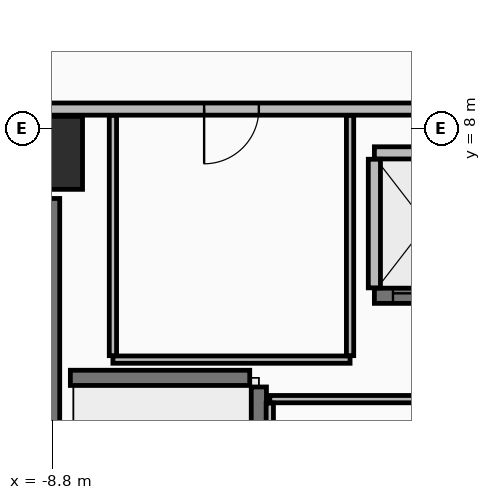
"""IFC4 building model, lengths in metres.
Left out: names, types, materials, properties, quantities, classifications, styles, units other than length and angle.
Written with IfcOpenShell. Run it as: python <this file> out.ifc"""

import sys

from ifc_helpers import new_model, si_unit, direction, frame, frame_2d, origin, origin_2d, place, context, subcontext, project, spatial, rectangle, extrude, element, fill, save


model = new_model("IFC4")
c1 = context("Model", 3, precision=1e-05, world=origin(), true_north=direction((0.0, 1.0)))
c2 = subcontext(c1, "Body", "Model", "MODEL_VIEW")
j1 = project(units=[si_unit("LENGTHUNIT", "METRE"), si_unit("PLANEANGLEUNIT", "RADIAN")], contexts=[c1])
p1 = place(None, origin())
s1 = spatial("IfcSite", under=j1, at=p1, CompositionType="ELEMENT")
p2 = place(p1, origin())
s2 = spatial("IfcBuilding", under=s1, at=p2, CompositionType="ELEMENT")
p3 = place(p2, frame((0.0, 0.0, 211.25)))
s3 = spatial("IfcBuildingStorey", under=s2, at=p3, CompositionType="ELEMENT", Elevation=211.25)
p4 = place(p3, frame((-8.9, 7.6, 0.0), z_axis=(0.0, 0.0, 1.0), x_axis=(1.0, 0.0, 0.0)))
e1 = element("IfcColumn", 1, at=p4, inside=s3, PredefinedType="COLUMN", context=c2, shape_type="SweptSolid", body=[
    extrude(rectangle(XDim=1.2, YDim=1.2, at=origin_2d()), origin(), (0.0, 0.0, 1.0), 3.6),
])
p5 = place(p3, frame((-8.9, -3.85, 0.0), z_axis=(0.0, 0.0, 1.0), x_axis=(0.0, 1.0, 0.0)))
e2 = element("IfcWall", 2, at=p5, inside=s3, PredefinedType="SHEAR", context=c2, shape_type="SweptSolid", body=[
    extrude(rectangle(XDim=10.7, YDim=0.45, at=frame_2d((5.35, 0.0))), origin(), (0.0, 0.0, 1.0), 3.42),
])
p6 = place(p3, frame((9.62, 8.32, 0.0), z_axis=(0.0, 0.0, 1.0), x_axis=(-1.0, 0.0, 0.0)))
e3 = element("IfcWall", 3, at=p6, inside=s3, PredefinedType="PARTITIONING", context=c2, shape_type="SweptSolid", body=[
    extrude(rectangle(XDim=19.24, YDim=0.2, at=frame_2d((9.62, 0.0))), origin(), (0.0, 0.0, 1.0), 2.865),
])
p7 = place(p6, frame((15.02, 0.0, 0.0)))
e4 = element("IfcOpeningElement", 4, at=p7, cuts=e3, PredefinedType="OPENING", context=c2, shape_type="SweptSolid", body=[
    extrude(rectangle(XDim=0.9, YDim=2.1, at=frame_2d((0.45, 1.05))), frame((0.0, 0.11, 0.0), z_axis=(0.0, -1.0, 0.0), x_axis=(1.0, 0.0, 0.0)), (0.0, 0.0, 1.0), 0.22),
])
p8 = place(p3, frame((-5.4, -3.55, 0.0), z_axis=(0.0, 0.0, 1.0), x_axis=(0.0, 1.0, 0.0)))
e5 = element("IfcWall", 5, at=p8, inside=s3, PredefinedType="SHEAR", context=c2, shape_type="SweptSolid", body=[
    extrude(rectangle(XDim=7.3, YDim=0.25, at=frame_2d((3.65, 0.0))), origin(), (0.0, 0.0, 1.0), 3.42),
])
p9 = place(p3, frame((-8.5, 3.9, 0.0), z_axis=(0.0, 0.0, 1.0), x_axis=(1.0, 0.0, 0.0)))
e6 = element("IfcWall", 6, at=p9, inside=s3, PredefinedType="SHEAR", context=c2, shape_type="SweptSolid", body=[
    extrude(rectangle(XDim=2.95, YDim=0.25, at=frame_2d((1.475, 0.0))), origin(), (0.0, 0.0, 1.0), 3.42),
])
p10 = place(p3, frame((-3.5, 5.25, 0.0), z_axis=(0.0, 0.0, 1.0), x_axis=(1.0, 0.0, 0.0)))
e7 = element("IfcWall", 7, at=p10, inside=s3, PredefinedType="SHEAR", context=c2, shape_type="SweptSolid", body=[
    extrude(rectangle(XDim=1.712, YDim=0.25, at=frame_2d((0.856, 0.0))), origin(), (0.0, 0.0, 1.0), 3.42),
])
p11 = place(p10, frame((0.306, 0.0, 0.0)))
e8 = element("IfcOpeningElement", 8, at=p11, cuts=e7, PredefinedType="OPENING", context=c2, shape_type="SweptSolid", body=[
    extrude(rectangle(XDim=1.1, YDim=2.2, at=frame_2d((0.55, 1.1))), frame((0.0, 0.135, 0.0), z_axis=(0.0, -1.0, 0.0), x_axis=(1.0, 0.0, 0.0)), (0.0, 0.0, 1.0), 0.27),
])
p12 = place(p3, frame((-3.5, 7.6, 0.0), z_axis=(0.0, 0.0, 1.0), x_axis=(1.0, 0.0, 0.0)))
e9 = element("IfcWall", 9, at=p12, inside=s3, PredefinedType="PARTITIONING", context=c2, shape_type="SweptSolid", body=[
    extrude(rectangle(XDim=0.7, YDim=0.2, at=frame_2d((0.35, 0.0))), origin(), (0.0, 0.0, 1.0), 2.715),
])
p13 = place(p3, frame((-3.5, 5.38, 0.0), z_axis=(0.0, 0.0, 1.0), x_axis=(0.0, 1.0, 0.0)))
e10 = element("IfcWall", 10, at=p13, inside=s3, PredefinedType="PARTITIONING", context=c2, shape_type="SweptSolid", body=[
    extrude(rectangle(XDim=2.115, YDim=0.2, at=frame_2d((1.058, 0.0))), origin(), (0.0, 0.0, 1.0), 2.715),
])
p14 = place(p3, frame((-2.115, 3.55, 0.0), z_axis=(0.0, 0.0, 1.0), x_axis=(-1.0, 0.0, 0.0)))
e11 = element("IfcWall", 11, at=p14, inside=s3, PredefinedType="PARTITIONING", context=c2, shape_type="SweptSolid", body=[
    extrude(rectangle(XDim=3.105, YDim=0.12, at=frame_2d((1.552, 0.0))), origin(), (0.0, 0.0, 1.0), 3.42),
])
p15 = place(p3, frame((-5.22, 3.485, 0.0), z_axis=(0.0, 0.0, 1.0), x_axis=(0.0, -1.0, 0.0)))
e12 = element("IfcWall", 12, at=p15, inside=s3, PredefinedType="PARTITIONING", context=c2, shape_type="SweptSolid", body=[
    extrude(rectangle(XDim=2.97, YDim=0.12, at=frame_2d((1.485, 0.0))), origin(), (0.0, 0.0, 1.0), 3.42),
])
p16 = place(p3, frame((-7.8, 4.2, 0.0), z_axis=(0.0, 0.0, 1.0), x_axis=(1.0, 0.0, 0.0)))
e13 = element("IfcWall", 13, at=p16, inside=s3, PredefinedType="PARTITIONING", context=c2, shape_type="SweptSolid", body=[
    extrude(rectangle(XDim=3.9, YDim=0.12, at=frame_2d((1.95, 0.0))), origin(), (0.0, 0.0, 1.0), 3.42),
])
for number, where, z_axis, x_axis in (
    (14, (-3.9, 4.265, 0.0), (0.0, 0.0, 1.0), (0.0, 1.0, 0.0)),
    (15, (-7.8, 8.215, 0.0), (0.0, 0.0, 1.0), (0.0, -1.0, 0.0)),
):
    element("IfcWall", number, at=place(p3, frame(where, z_axis=z_axis, x_axis=x_axis)), inside=s3, PredefinedType="PARTITIONING", context=c2, shape_type="SweptSolid", body=[
        extrude(rectangle(XDim=3.95, YDim=0.12, at=frame_2d((1.975, 0.0))), origin(), (0.0, 0.0, 1.0), 2.715),
    ])
p17 = place(p11, origin())
e16 = element("IfcDoor", 16, at=p17, inside=s3, OperationType="SLIDING_TO_LEFT", PredefinedType="DOOR", context=c2, shape_type="SweptSolid", body=[
    extrude(rectangle(XDim=1.1, YDim=2.2, at=frame_2d((0.55, 1.1))), frame((0.0, 0.025, 0.0), z_axis=(0.0, -1.0, 0.0), x_axis=(1.0, 0.0, 0.0)), (0.0, 0.0, 1.0), 0.05),
])
fill(e8, e16)
p18 = place(p7, frame((0.9, 0.0, 0.0), z_axis=(0.0, 0.0, 1.0), x_axis=(-1.0, 0.0, 0.0)))
e17 = element("IfcDoor", 17, at=p18, inside=s3, OperationType="SINGLE_SWING_LEFT", PredefinedType="DOOR", context=c2, shape_type="SweptSolid", body=[
    extrude(rectangle(XDim=0.9, YDim=2.1, at=frame_2d((0.45, 1.05))), frame((0.0, 0.025, 0.0), z_axis=(0.0, -1.0, 0.0), x_axis=(1.0, 0.0, 0.0)), (0.0, 0.0, 1.0), 0.05),
])
fill(e4, e17)
save(model, sys.argv[1])
